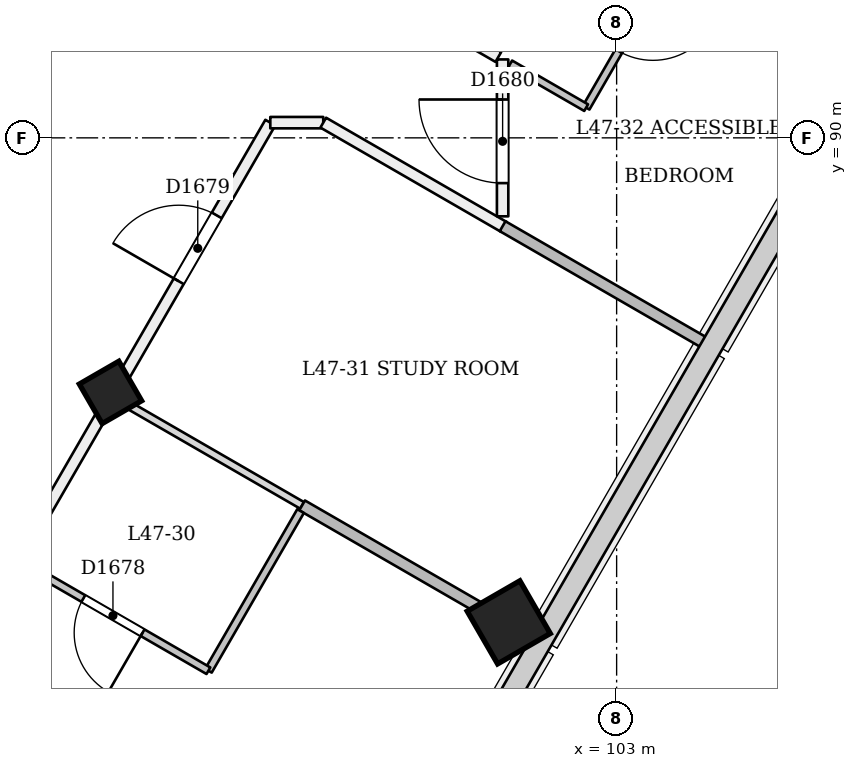
"""IFC4 building model, lengths in metres.
Left out: names, types, materials, properties, quantities, classifications, styles, units other than length and angle.
Written with IfcOpenShell. Run it as: python <this file> out.ifc"""

import sys

from ifc_helpers import new_model, si_unit, direction, frame, frame_2d, origin, origin_2d, place, context, subcontext, project, spatial, rectangle, extrude, element, fill, save


model = new_model("IFC4")
c1 = context("Model", 3, precision=1e-05, world=origin(), true_north=direction((0.0, 1.0)))
c2 = subcontext(c1, "Body", "Model", "MODEL_VIEW")
j1 = project(units=[si_unit("LENGTHUNIT", "METRE"), si_unit("PLANEANGLEUNIT", "RADIAN")], contexts=[c1])
p1 = place(None, origin())
s1 = spatial("IfcSite", under=j1, at=p1, CompositionType="ELEMENT")
p2 = place(p1, origin())
s2 = spatial("IfcBuilding", under=s1, at=p2, CompositionType="ELEMENT")
p3 = place(p2, frame((0.0, 0.0, 181.8)))
s3 = spatial("IfcBuildingStorey", under=s2, at=p3, CompositionType="ELEMENT", Elevation=181.8)
p4 = place(p3, frame((96.368, 86.604, -0.018), z_axis=(-0.02215369191, 0.038413282303, 0.999016333038), x_axis=(-0.500654723088, -0.865363077154, 0.022171895449)))
e1 = element("IfcColumn", 1, at=p4, inside=s3, PredefinedType="COLUMN", context=c2, shape_type="SweptSolid", body=[
    extrude(rectangle(XDim=0.6, YDim=0.6, at=origin_2d()), origin(), (0.0, 0.0, 1.0), 3.604),
])
p5 = place(p3, frame((101.608, 83.579, -0.024), z_axis=(-0.02222134892, 0.038480872521, 0.999012229206), x_axis=(-0.500171903671, -0.86564104797, 0.022218074789)))
e2 = element("IfcColumn", 2, at=p5, inside=s3, PredefinedType="COLUMN", context=c2, shape_type="SweptSolid", body=[
    extrude(rectangle(XDim=0.8, YDim=0.8, at=origin_2d()), origin(), (0.0, 0.0, 1.0), 3.604),
])
p6 = place(p3, frame((85.033, 66.972, 0.0), z_axis=(0.0, 0.0, 1.0), x_axis=(0.500001115073, 0.866024759996, 0.0)))
e3 = element("IfcWall", 3, at=p6, inside=s3, PredefinedType="PARTITIONING", context=c2, shape_type="SweptSolid", body=[
    extrude(rectangle(XDim=26.822, YDim=0.15, at=frame_2d((13.411, 0.0))), origin(), (0.0, 0.0, 1.0), 2.75),
])
p7 = place(p6, frame((0.527, 0.0, 0.0)))
e4 = element("IfcOpeningElement", 4, at=p7, cuts=e3, PredefinedType="OPENING", context=c2, shape_type="SweptSolid", body=[
    extrude(rectangle(XDim=1.2, YDim=2.1, at=frame_2d((0.6, 1.05))), frame((0.0, 0.085, 0.0), z_axis=(0.0, -1.0, 0.0), x_axis=(1.0, 0.0, 0.0)), (0.0, 0.0, 1.0), 0.171),
])
p8 = place(p6, frame((7.566, 0.0, 0.0)))
e5 = element("IfcOpeningElement", 5, at=p8, cuts=e3, PredefinedType="OPENING", context=c2, shape_type="SweptSolid", body=[
    extrude(rectangle(XDim=1.0, YDim=2.1, at=frame_2d((0.5, 1.05))), frame((0.0, 0.085, 0.0), z_axis=(0.0, -1.0, 0.0), x_axis=(1.0, 0.0, 0.0)), (0.0, 0.0, 1.0), 0.171),
])
p9 = place(p6, frame((9.891, 0.0, 0.0)))
e6 = element("IfcOpeningElement", 6, at=p9, cuts=e3, PredefinedType="OPENING", context=c2, shape_type="SweptSolid", body=[
    extrude(rectangle(XDim=1.0, YDim=2.1, at=frame_2d((0.5, 1.05))), frame((0.0, 0.085, 0.0), z_axis=(0.0, -1.0, 0.0), x_axis=(1.0, 0.0, 0.0)), (0.0, 0.0, 1.0), 0.171),
])
p10 = place(p6, frame((16.45, 0.0, 0.0)))
e7 = element("IfcOpeningElement", 7, at=p10, cuts=e3, PredefinedType="OPENING", context=c2, shape_type="SweptSolid", body=[
    extrude(rectangle(XDim=1.0, YDim=2.1, at=frame_2d((0.5, 1.05))), frame((0.0, 0.085, 0.0), z_axis=(0.0, -1.0, 0.0), x_axis=(1.0, 0.0, 0.0)), (0.0, 0.0, 1.0), 0.171),
])
p11 = place(p6, frame((18.891, 0.0, 0.0)))
e8 = element("IfcOpeningElement", 8, at=p11, cuts=e3, PredefinedType="OPENING", context=c2, shape_type="SweptSolid", body=[
    extrude(rectangle(XDim=1.0, YDim=2.1, at=frame_2d((0.5, 1.05))), frame((0.0, 0.085, 0.0), z_axis=(0.0, -1.0, 0.0), x_axis=(1.0, 0.0, 0.0)), (0.0, 0.0, 1.0), 0.171),
])
p12 = place(p6, frame((24.413, 0.0, 0.0)))
e9 = element("IfcOpeningElement", 9, at=p12, cuts=e3, PredefinedType="OPENING", context=c2, shape_type="SweptSolid", body=[
    extrude(rectangle(XDim=1.0, YDim=2.1, at=frame_2d((0.5, 1.05))), frame((0.0, 0.085, 0.0), z_axis=(0.0, -1.0, 0.0), x_axis=(1.0, 0.0, 0.0)), (0.0, 0.0, 1.0), 0.171),
])
p13 = place(p3, frame((98.444, 90.2, 0.0), z_axis=(0.0, 0.0, 1.0), x_axis=(1.0, 0.0, 0.0)))
e10 = element("IfcWall", 10, at=p13, inside=s3, PredefinedType="PARTITIONING", context=c2, shape_type="SweptSolid", body=[
    extrude(rectangle(XDim=0.697, YDim=0.15, at=frame_2d((0.348, 0.0))), origin(), (0.0, 0.0, 1.0), 3.15),
])
p14 = place(p3, frame((99.14, 90.2, 0.0), z_axis=(0.0, 0.0, 1.0), x_axis=(0.866028570666, -0.499994514761, 0.0)))
e11 = element("IfcWall", 11, at=p14, inside=s3, PredefinedType="PARTITIONING", context=c2, shape_type="SweptSolid", body=[
    extrude(rectangle(XDim=2.745, YDim=0.15, at=frame_2d((1.372, 0.0))), origin(), (0.0, 0.0, 1.0), 3.15),
])
p15 = place(p3, frame((101.5, 88.968, 0.0), z_axis=(0.0, 0.0, 1.0), x_axis=(0.0, 1.0, 0.0)))
e12 = element("IfcWall", 12, at=p15, inside=s3, PredefinedType="PARTITIONING", context=c2, shape_type="SweptSolid", body=[
    extrude(rectangle(XDim=2.064, YDim=0.15, at=frame_2d((1.032, 0.0))), origin(), (0.0, 0.0, 1.0), 3.15),
])
p16 = place(p15, frame((0.437, 0.0, 0.0)))
e13 = element("IfcOpeningElement", 13, at=p16, cuts=e12, PredefinedType="OPENING", context=c2, shape_type="SweptSolid", body=[
    extrude(rectangle(XDim=1.1, YDim=2.1, at=frame_2d((0.55, 1.05))), frame((0.0, 0.085, 0.0), z_axis=(0.0, -1.0, 0.0), x_axis=(1.0, 0.0, 0.0)), (0.0, 0.0, 1.0), 0.171),
])
p17 = place(p3, frame((101.444, 91.064, 0.0), z_axis=(0.0, 0.0, 1.0), x_axis=(-0.866042076863, 0.499971120268, 0.0)))
e14 = element("IfcWall", 14, at=p17, inside=s3, PredefinedType="PARTITIONING", context=c2, shape_type="SweptSolid", body=[
    extrude(rectangle(XDim=1.898, YDim=0.15, at=frame_2d((0.949, 0.0))), origin(), (0.0, 0.0, 1.0), 3.15),
])
p18 = place(p3, frame((98.842, 85.09, 0.0), z_axis=(0.0, 0.0, 1.0), x_axis=(-0.499972286653, -0.866041403502, 0.0)))
e15 = element("IfcWall", 15, at=p18, inside=s3, PredefinedType="PARTITIONING", context=c2, shape_type="SweptSolid", body=[
    extrude(rectangle(XDim=2.425, YDim=0.1, at=frame_2d((1.212, 0.0))), origin(), (0.0, 0.0, 1.0), 2.75),
])
p19 = place(p3, frame((97.629, 82.99, 0.0), z_axis=(0.0, 0.0, 1.0), x_axis=(-0.866011447264, 0.500024172624, 0.0)))
e16 = element("IfcWall", 16, at=p19, inside=s3, PredefinedType="PARTITIONING", context=c2, shape_type="SweptSolid", body=[
    extrude(rectangle(XDim=2.825, YDim=0.1, at=frame_2d((1.413, 0.0))), origin(), (0.0, 0.0, 1.0), 3.15),
])
p20 = place(p19, frame((1.0, 0.0, 0.0)))
e17 = element("IfcOpeningElement", 17, at=p20, cuts=e16, PredefinedType="OPENING", context=c2, shape_type="SweptSolid", body=[
    extrude(rectangle(XDim=0.9, YDim=2.1, at=frame_2d((0.45, 1.05))), frame((0.0, 0.061, 0.0), z_axis=(0.0, -1.0, 0.0), x_axis=(1.0, 0.0, 0.0)), (0.0, 0.0, 1.0), 0.121),
])
p21 = place(p3, frame((101.91, 83.405, 0.0), z_axis=(0.0, 0.0, 1.0), x_axis=(-0.866019260715, 0.500010639957, 0.0)))
e18 = element("IfcWall", 18, at=p21, inside=s3, PredefinedType="PARTITIONING", context=c2, shape_type="SweptSolid", body=[
    extrude(rectangle(XDim=3.52, YDim=0.15, at=frame_2d((1.76, 0.0))), origin(), (0.0, 0.0, 1.0), 2.65),
])
p22 = place(p3, frame((98.862, 85.165, 0.0), z_axis=(0.0, 0.0, 1.0), x_axis=(-0.866011654119, 0.500023814363, 0.0)))
e19 = element("IfcWall", 19, at=p22, inside=s3, PredefinedType="PARTITIONING", context=c2, shape_type="SweptSolid", body=[
    extrude(rectangle(XDim=2.805, YDim=0.1, at=frame_2d((1.402, 0.0))), origin(), (0.0, 0.0, 1.0), 2.75),
])
p23 = place(p3, frame((104.178, 87.292, 0.0), z_axis=(0.0, 0.0, 1.0), x_axis=(-0.866023868869, 0.500002658542, 0.0)))
e20 = element("IfcWall", 20, at=p23, inside=s3, PredefinedType="PARTITIONING", context=c2, shape_type="SweptSolid", body=[
    extrude(rectangle(XDim=3.092, YDim=0.15, at=frame_2d((1.546, 0.0))), origin(), (0.0, 0.0, 1.0), 2.65),
])
p24 = place(p3, frame((103.874, 92.605, 0.0), z_axis=(0.0, 0.0, 1.0), x_axis=(-0.500062241894, -0.865989465428, 0.0)))
e21 = element("IfcWall", 21, at=p24, inside=s3, PredefinedType="PARTITIONING", context=c2, shape_type="SweptSolid", body=[
    extrude(rectangle(XDim=2.55, YDim=0.1, at=frame_2d((1.275, 0.0))), origin(), (0.0, 0.0, 1.0), 2.75),
])
p25 = place(p24, frame((0.792, 0.0, 0.0)))
e22 = element("IfcOpeningElement", 22, at=p25, cuts=e21, PredefinedType="OPENING", context=c2, shape_type="SweptSolid", body=[
    extrude(rectangle(XDim=0.9, YDim=2.1, at=frame_2d((0.45, 1.05))), frame((0.0, 0.061, 0.0), z_axis=(0.0, -1.0, 0.0), x_axis=(1.0, 0.0, 0.0)), (0.0, 0.0, 1.0), 0.121),
])
p26 = place(p3, frame((102.599, 90.397, 0.0), z_axis=(0.0, 0.0, 1.0), x_axis=(-0.866019899421, 0.500009533716, 0.0)))
e23 = element("IfcWall", 23, at=p26, inside=s3, PredefinedType="PARTITIONING", context=c2, shape_type="SweptSolid", body=[
    extrude(rectangle(XDim=1.153, YDim=0.1, at=frame_2d((0.577, 0.0))), origin(), (0.0, 0.0, 1.0), 3.15),
])
p27 = place(p20, origin())
e24 = element("IfcDoor", 24, at=p27, inside=s3, OperationType="SINGLE_SWING_LEFT", PredefinedType="NOTDEFINED", context=c2, shape_type="SweptSolid", body=[
    extrude(rectangle(XDim=0.9, YDim=2.1, at=frame_2d((0.45, 1.05))), frame((0.0, 0.025, 0.0), z_axis=(0.0, -1.0, 0.0), x_axis=(1.0, 0.0, 0.0)), (0.0, 0.0, 1.0), 0.05),
])
fill(e17, e24)
p28 = place(p12, origin())
e25 = element("IfcDoor", 25, at=p28, inside=s3, OperationType="SINGLE_SWING_LEFT", PredefinedType="NOTDEFINED", context=c2, shape_type="SweptSolid", body=[
    extrude(rectangle(XDim=1.0, YDim=2.1, at=frame_2d((0.5, 1.05))), frame((0.0, 0.025, 0.0), z_axis=(0.0, -1.0, 0.0), x_axis=(1.0, 0.0, 0.0)), (0.0, 0.0, 1.0), 0.05),
])
fill(e9, e25)
p29 = place(p16, origin())
e26 = element("IfcDoor", 26, at=p29, inside=s3, OperationType="SINGLE_SWING_RIGHT", PredefinedType="NOTDEFINED", context=c2, shape_type="SweptSolid", body=[
    extrude(rectangle(XDim=1.1, YDim=2.1, at=frame_2d((0.55, 1.05))), frame((0.0, 0.025, 0.0), z_axis=(0.0, -1.0, 0.0), x_axis=(1.0, 0.0, 0.0)), (0.0, 0.0, 1.0), 0.05),
])
fill(e13, e26)
save(model, sys.argv[1])
